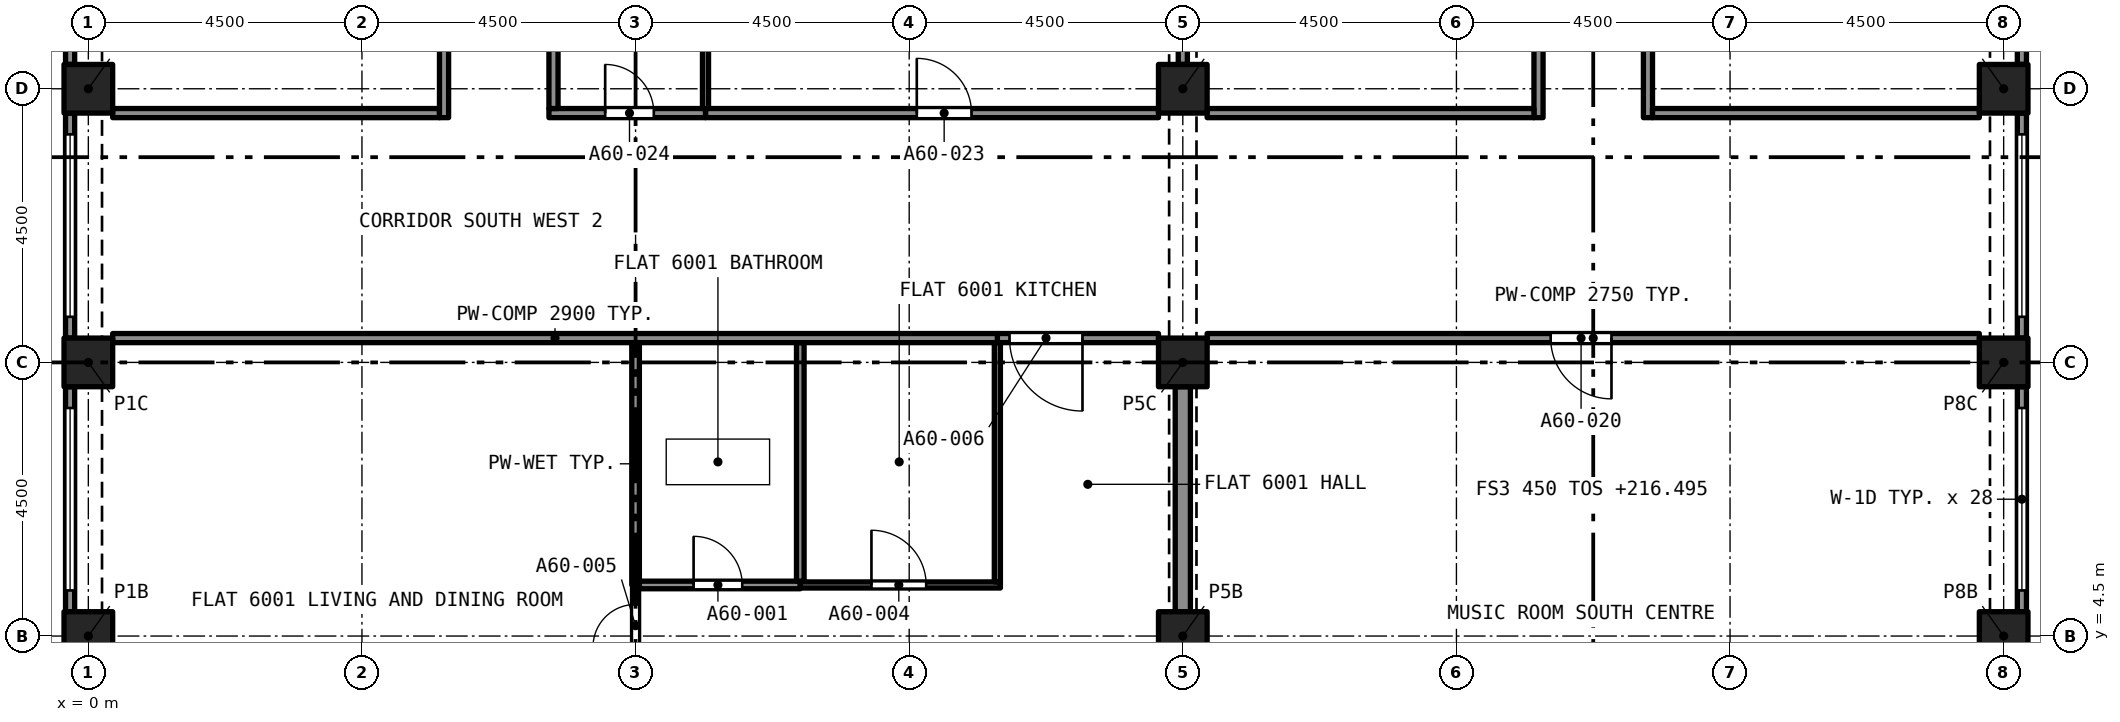
"""IFC4 building model, lengths in metres.
Left out: names, types, materials, properties, quantities, classifications, styles, units other than length and angle.
Written with IfcOpenShell. Run it as: python <this file> out.ifc"""

import sys

from ifc_helpers import new_model, si_unit, direction, frame, frame_2d, origin, origin_2d, place, context, subcontext, project, spatial, rectangle, extrude, element, fill, save


model = new_model("IFC4")
c1 = context("Model", 3, precision=1e-05, world=origin(), true_north=direction((0.0, 1.0)))
c2 = subcontext(c1, "Body", "Model", "MODEL_VIEW")
j1 = project(units=[si_unit("LENGTHUNIT", "METRE"), si_unit("PLANEANGLEUNIT", "RADIAN")], contexts=[c1])
p1 = place(None, origin())
s1 = spatial("IfcSite", under=j1, at=p1, CompositionType="ELEMENT")
p2 = place(p1, origin())
s2 = spatial("IfcBuilding", under=s1, at=p2, CompositionType="ELEMENT")
p3 = place(p2, frame((0.0, 0.0, 216.495)))
s3 = spatial("IfcBuildingStorey", under=s2, at=p3, CompositionType="ELEMENT", Elevation=216.495)
for number, where, z_axis, x_axis in (
    (1, (0.0, 4.5, 0.0), (0.0, 0.0, 1.0), (1.0, 0.0, 0.0)),
    (2, (18.0, 4.5, 0.0), (0.0, 0.0, 1.0), (1.0, 0.0, 0.0)),
    (3, (31.5, 4.5, 0.0), (0.0, 0.0, 1.0), (1.0, 0.0, 0.0)),
    (4, (0.0, 9.0, 0.0), (0.0, 0.0, 1.0), (1.0, 0.0, 0.0)),
    (5, (18.0, 9.0, 0.0), (0.0, 0.0, 1.0), (1.0, 0.0, 0.0)),
    (6, (31.5, 9.0, 0.0), (0.0, 0.0, 1.0), (1.0, 0.0, 0.0)),
    (7, (0.0, 13.5, 0.0), (0.0, 0.0, 1.0), (1.0, 0.0, 0.0)),
    (8, (18.0, 13.5, 0.0), (0.0, 0.0, 1.0), (1.0, 0.0, 0.0)),
    (9, (31.5, 13.5, 0.0), (0.0, 0.0, 1.0), (1.0, 0.0, 0.0)),
):
    element("IfcColumn", number, at=place(p3, frame(where, z_axis=z_axis, x_axis=x_axis)), inside=s3, PredefinedType="COLUMN", context=c2, shape_type="SweptSolid", body=[
        extrude(rectangle(XDim=0.8, YDim=0.8, at=origin_2d()), origin(), (0.0, 0.0, 1.0), 3.2),
    ])
p4 = place(p3, frame((31.8, 8.6, 0.0), z_axis=(0.0, 0.0, 1.0), x_axis=(0.0, -1.0, 0.0)))
e10 = element("IfcWall", 10, at=p4, inside=s3, PredefinedType="SOLIDWALL", context=c2, shape_type="SweptSolid", body=[
    extrude(rectangle(XDim=3.7, YDim=0.15, at=frame_2d((1.85, 0.0))), origin(), (0.0, 0.0, 1.0), 3.2),
])
p5 = place(p4, frame((0.35, 0.0, 0.45)))
e11 = element("IfcOpeningElement", 11, at=p5, cuts=e10, PredefinedType="OPENING", context=c2, shape_type="SweptSolid", body=[
    extrude(rectangle(XDim=3.0, YDim=1.95, at=frame_2d((1.5, 0.975))), frame((0.0, 0.085, 0.0), z_axis=(0.0, -1.0, 0.0), x_axis=(1.0, 0.0, 0.0)), (0.0, 0.0, 1.0), 0.17),
])
p6 = place(p3, frame((31.8, 13.1, 0.0), z_axis=(0.0, 0.0, 1.0), x_axis=(0.0, -1.0, 0.0)))
e12 = element("IfcWall", 12, at=p6, inside=s3, PredefinedType="SOLIDWALL", context=c2, shape_type="SweptSolid", body=[
    extrude(rectangle(XDim=3.7, YDim=0.15, at=frame_2d((1.85, 0.0))), origin(), (0.0, 0.0, 1.0), 3.2),
])
p7 = place(p6, frame((0.35, 0.0, 0.45)))
e13 = element("IfcOpeningElement", 13, at=p7, cuts=e12, PredefinedType="OPENING", context=c2, shape_type="SweptSolid", body=[
    extrude(rectangle(XDim=3.0, YDim=1.95, at=frame_2d((1.5, 0.975))), frame((0.0, 0.085, 0.0), z_axis=(0.0, -1.0, 0.0), x_axis=(1.0, 0.0, 0.0)), (0.0, 0.0, 1.0), 0.17),
])
p8 = place(p3, frame((31.8, 17.6, 0.0), z_axis=(0.0, 0.0, 1.0), x_axis=(0.0, -1.0, 0.0)))
e14 = element("IfcWall", 14, at=p8, inside=s3, PredefinedType="SOLIDWALL", context=c2, shape_type="SweptSolid", body=[
    extrude(rectangle(XDim=3.7, YDim=0.15, at=frame_2d((1.85, 0.0))), origin(), (0.0, 0.0, 1.0), 3.2),
])
p9 = place(p8, frame((0.35, 0.0, 0.45)))
e15 = element("IfcOpeningElement", 15, at=p9, cuts=e14, PredefinedType="OPENING", context=c2, shape_type="SweptSolid", body=[
    extrude(rectangle(XDim=3.0, YDim=1.95, at=frame_2d((1.5, 0.975))), frame((0.0, 0.085, 0.0), z_axis=(0.0, -1.0, 0.0), x_axis=(1.0, 0.0, 0.0)), (0.0, 0.0, 1.0), 0.17),
])
p10 = place(p3, frame((-0.3, 13.9, 0.0), z_axis=(0.0, 0.0, 1.0), x_axis=(0.0, 1.0, 0.0)))
e16 = element("IfcWall", 16, at=p10, inside=s3, PredefinedType="SOLIDWALL", context=c2, shape_type="SweptSolid", body=[
    extrude(rectangle(XDim=3.7, YDim=0.15, at=frame_2d((1.85, 0.0))), origin(), (0.0, 0.0, 1.0), 3.2),
])
p11 = place(p10, frame((0.35, 0.0, 0.45)))
e17 = element("IfcOpeningElement", 17, at=p11, cuts=e16, PredefinedType="OPENING", context=c2, shape_type="SweptSolid", body=[
    extrude(rectangle(XDim=3.0, YDim=1.95, at=frame_2d((1.5, 0.975))), frame((0.0, 0.085, 0.0), z_axis=(0.0, -1.0, 0.0), x_axis=(1.0, 0.0, 0.0)), (0.0, 0.0, 1.0), 0.17),
])
p12 = place(p3, frame((-0.3, 9.4, 0.0), z_axis=(0.0, 0.0, 1.0), x_axis=(0.0, 1.0, 0.0)))
e18 = element("IfcWall", 18, at=p12, inside=s3, PredefinedType="SOLIDWALL", context=c2, shape_type="SweptSolid", body=[
    extrude(rectangle(XDim=3.7, YDim=0.15, at=frame_2d((1.85, 0.0))), origin(), (0.0, 0.0, 1.0), 3.2),
])
p13 = place(p12, frame((0.35, 0.0, 0.45)))
e19 = element("IfcOpeningElement", 19, at=p13, cuts=e18, PredefinedType="OPENING", context=c2, shape_type="SweptSolid", body=[
    extrude(rectangle(XDim=3.0, YDim=1.95, at=frame_2d((1.5, 0.975))), frame((0.0, 0.085, 0.0), z_axis=(0.0, -1.0, 0.0), x_axis=(1.0, 0.0, 0.0)), (0.0, 0.0, 1.0), 0.17),
])
p14 = place(p3, frame((-0.3, 4.9, 0.0), z_axis=(0.0, 0.0, 1.0), x_axis=(0.0, 1.0, 0.0)))
e20 = element("IfcWall", 20, at=p14, inside=s3, PredefinedType="SOLIDWALL", context=c2, shape_type="SweptSolid", body=[
    extrude(rectangle(XDim=3.7, YDim=0.15, at=frame_2d((1.85, 0.0))), origin(), (0.0, 0.0, 1.0), 3.2),
])
p15 = place(p14, frame((0.35, 0.0, 0.45)))
e21 = element("IfcOpeningElement", 21, at=p15, cuts=e20, PredefinedType="OPENING", context=c2, shape_type="SweptSolid", body=[
    extrude(rectangle(XDim=3.0, YDim=1.95, at=frame_2d((1.5, 0.975))), frame((0.0, 0.085, 0.0), z_axis=(0.0, -1.0, 0.0), x_axis=(1.0, 0.0, 0.0)), (0.0, 0.0, 1.0), 0.17),
])
p16 = place(p3, frame((9.062, 5.34, 0.0), z_axis=(0.0, 0.0, 1.0), x_axis=(1.0, 0.0, 0.0)))
e22 = element("IfcWall", 22, at=p16, inside=s3, PredefinedType="PARTITIONING", context=c2, shape_type="SweptSolid", body=[
    extrude(rectangle(XDim=2.646, YDim=0.125, at=frame_2d((1.323, 0.0))), origin(), (0.0, 0.0, 1.0), 2.9),
])
p17 = place(p16, frame((0.892, 0.0, 0.0)))
e23 = element("IfcOpeningElement", 23, at=p17, cuts=e22, PredefinedType="OPENING", context=c2, shape_type="SweptSolid", body=[
    extrude(rectangle(XDim=0.8, YDim=2.1, at=frame_2d((0.4, 1.05))), frame((0.0, 0.073, 0.0), z_axis=(0.0, -1.0, 0.0), x_axis=(1.0, 0.0, 0.0)), (0.0, 0.0, 1.0), 0.145),
])
p18 = place(p3, frame((11.709, 5.403, 0.0), z_axis=(0.0, 0.0, 1.0), x_axis=(0.0, 1.0, 0.0)))
e24 = element("IfcWall", 24, at=p18, inside=s3, PredefinedType="PARTITIONING", context=c2, shape_type="SweptSolid", body=[
    extrude(rectangle(XDim=3.922, YDim=0.125, at=frame_2d((1.961, 0.0))), origin(), (0.0, 0.0, 1.0), 2.9),
])
p19 = place(p3, frame((9.0, 5.34, 0.0), z_axis=(0.0, 0.0, 1.0), x_axis=(0.0, 1.0, 0.0)))
e25 = element("IfcWall", 25, at=p19, inside=s3, PredefinedType="PARTITIONING", context=c2, shape_type="SweptSolid", body=[
    extrude(rectangle(XDim=3.985, YDim=0.125, at=frame_2d((1.992, 0.0))), origin(), (0.0, 0.0, 1.0), 2.9),
])
p20 = place(p3, frame((11.708, 5.34, 0.0), z_axis=(0.0, 0.0, 1.0), x_axis=(1.0, 0.0, 0.0)))
e26 = element("IfcWall", 26, at=p20, inside=s3, PredefinedType="PARTITIONING", context=c2, shape_type="SweptSolid", body=[
    extrude(rectangle(XDim=3.292, YDim=0.1, at=frame_2d((1.646, 0.0))), origin(), (0.0, 0.0, 1.0), 2.9),
])
p21 = place(p20, frame((1.171, 0.0, 0.0)))
e27 = element("IfcOpeningElement", 27, at=p21, cuts=e26, PredefinedType="OPENING", context=c2, shape_type="SweptSolid", body=[
    extrude(rectangle(XDim=0.9, YDim=2.1, at=frame_2d((0.45, 1.05))), frame((0.0, 0.06, 0.0), z_axis=(0.0, -1.0, 0.0), x_axis=(1.0, 0.0, 0.0)), (0.0, 0.0, 1.0), 0.12),
])
p22 = place(p3, frame((14.95, 5.39, 0.0), z_axis=(0.0, 0.0, 1.0), x_axis=(0.0, 1.0, 0.0)))
e28 = element("IfcWall", 28, at=p22, inside=s3, PredefinedType="PARTITIONING", context=c2, shape_type="SweptSolid", body=[
    extrude(rectangle(XDim=3.935, YDim=0.1, at=frame_2d((1.968, 0.0))), origin(), (0.0, 0.0, 1.0), 2.9),
])
p23 = place(p3, frame((9.0, 4.0, 0.0), z_axis=(0.0, 0.0, 1.0), x_axis=(0.0, 1.0, 0.0)))
e29 = element("IfcWall", 29, at=p23, inside=s3, PredefinedType="PARTITIONING", context=c2, shape_type="SweptSolid", body=[
    extrude(rectangle(XDim=1.34, YDim=0.1, at=frame_2d((0.67, 0.0))), origin(), (0.0, 0.0, 1.0), 2.9),
])
p24 = place(p23, frame((0.32, 0.0, 0.0)))
e30 = element("IfcOpeningElement", 30, at=p24, cuts=e29, PredefinedType="OPENING", context=c2, shape_type="SweptSolid", body=[
    extrude(rectangle(XDim=0.7, YDim=2.1, at=frame_2d((0.35, 1.05))), frame((0.0, 0.06, 0.0), z_axis=(0.0, -1.0, 0.0), x_axis=(1.0, 0.0, 0.0)), (0.0, 0.0, 1.0), 0.12),
])
p25 = place(p3, frame((18.0, 4.9, 0.0), z_axis=(0.0, 0.0, 1.0), x_axis=(0.0, 1.0, 0.0)))
e31 = element("IfcWall", 31, at=p25, inside=s3, PredefinedType="PARTITIONING", context=c2, shape_type="SweptSolid", body=[
    extrude(rectangle(XDim=3.7, YDim=0.25, at=frame_2d((1.85, 0.0))), origin(), (0.0, 0.0, 1.0), 2.38),
])
p26 = place(p3, frame((17.6, 9.4, 0.0), z_axis=(0.0, 0.0, 1.0), x_axis=(-1.0, 0.0, 0.0)))
e32 = element("IfcWall", 32, at=p26, inside=s3, PredefinedType="PARTITIONING", context=c2, shape_type="SweptSolid", body=[
    extrude(rectangle(XDim=2.65, YDim=0.15, at=frame_2d((1.325, 0.0))), origin(), (0.0, 0.0, 1.0), 2.9),
])
p27 = place(p26, frame((1.25, 0.0, 0.0)))
e33 = element("IfcOpeningElement", 33, at=p27, cuts=e32, PredefinedType="OPENING", context=c2, shape_type="SweptSolid", body=[
    extrude(rectangle(XDim=1.2, YDim=2.4, at=frame_2d((0.6, 1.2))), frame((0.0, 0.085, 0.0), z_axis=(0.0, -1.0, 0.0), x_axis=(1.0, 0.0, 0.0)), (0.0, 0.0, 1.0), 0.17),
])
p28 = place(p3, frame((0.4, 9.4, 0.0), z_axis=(0.0, 0.0, 1.0), x_axis=(1.0, 0.0, 0.0)))
e34 = element("IfcWall", 34, at=p28, inside=s3, PredefinedType="PARTITIONING", context=c2, shape_type="SweptSolid", body=[
    extrude(rectangle(XDim=14.55, YDim=0.15, at=frame_2d((7.275, 0.0))), origin(), (0.0, 0.0, 1.0), 2.9),
])
p29 = place(p3, frame((31.1, 9.4, 0.0), z_axis=(0.0, 0.0, 1.0), x_axis=(-1.0, 0.0, 0.0)))
e35 = element("IfcWall", 35, at=p29, inside=s3, PredefinedType="PARTITIONING", context=c2, shape_type="SweptSolid", body=[
    extrude(rectangle(XDim=12.7, YDim=0.15, at=frame_2d((6.35, 0.0))), origin(), (0.0, 0.0, 1.0), 2.75),
])
p30 = place(p29, frame((6.05, 0.0, 0.0)))
e36 = element("IfcOpeningElement", 36, at=p30, cuts=e35, PredefinedType="OPENING", context=c2, shape_type="SweptSolid", body=[
    extrude(rectangle(XDim=1.0, YDim=2.1, at=frame_2d((0.5, 1.05))), frame((0.0, 0.085, 0.0), z_axis=(0.0, -1.0, 0.0), x_axis=(1.0, 0.0, 0.0)), (0.0, 0.0, 1.0), 0.17),
])
p31 = place(p3, frame((23.85, 13.025, 0.0), z_axis=(0.0, 0.0, 1.0), x_axis=(0.0, 1.0, 0.0)))
e37 = element("IfcWall", 37, at=p31, inside=s3, PredefinedType="PARTITIONING", context=c2, shape_type="SweptSolid", body=[
    extrude(rectangle(XDim=9.55, YDim=0.15, at=frame_2d((4.775, 0.0))), origin(), (0.0, 0.0, 1.0), 2.75),
])
p32 = place(p31, frame((4.275, 0.0, 0.0)))
e38 = element("IfcOpeningElement", 38, at=p32, cuts=e37, PredefinedType="OPENING", context=c2, shape_type="SweptSolid", body=[
    extrude(rectangle(XDim=1.0, YDim=2.1, at=frame_2d((0.5, 1.05))), frame((0.0, 0.085, 0.0), z_axis=(0.0, -1.0, 0.0), x_axis=(1.0, 0.0, 0.0)), (0.0, 0.0, 1.0), 0.17),
])
p33 = place(p3, frame((25.65, 22.575, 0.0), z_axis=(0.0, 0.0, 1.0), x_axis=(0.0, -1.0, 0.0)))
e39 = element("IfcWall", 39, at=p33, inside=s3, PredefinedType="PARTITIONING", context=c2, shape_type="SweptSolid", body=[
    extrude(rectangle(XDim=9.55, YDim=0.15, at=frame_2d((4.775, 0.0))), origin(), (0.0, 0.0, 1.0), 2.75),
])
p34 = place(p33, frame((4.275, 0.0, 0.0)))
e40 = element("IfcOpeningElement", 40, at=p34, cuts=e39, PredefinedType="OPENING", context=c2, shape_type="SweptSolid", body=[
    extrude(rectangle(XDim=1.0, YDim=2.1, at=frame_2d((0.5, 1.05))), frame((0.0, 0.085, 0.0), z_axis=(0.0, -1.0, 0.0), x_axis=(1.0, 0.0, 0.0)), (0.0, 0.0, 1.0), 0.17),
])
for number, where, z_axis, x_axis in (
    (41, (18.4, 13.1, 0.0), (0.0, 0.0, 1.0), (1.0, 0.0, 0.0)),
    (42, (25.725, 13.1, 0.0), (0.0, 0.0, 1.0), (1.0, 0.0, 0.0)),
):
    element("IfcWall", number, at=place(p3, frame(where, z_axis=z_axis, x_axis=x_axis)), inside=s3, PredefinedType="PARTITIONING", context=c2, shape_type="SweptSolid", body=[
        extrude(rectangle(XDim=5.375, YDim=0.15, at=frame_2d((2.688, 0.0))), origin(), (0.0, 0.0, 1.0), 2.75),
    ])
p35 = place(p3, frame((10.15, 13.1, 0.0), z_axis=(0.0, 0.0, 1.0), x_axis=(1.0, 0.0, 0.0)))
e43 = element("IfcWall", 43, at=p35, inside=s3, PredefinedType="PARTITIONING", context=c2, shape_type="SweptSolid", body=[
    extrude(rectangle(XDim=7.45, YDim=0.15, at=frame_2d((3.725, 0.0))), origin(), (0.0, 0.0, 1.0), 2.9),
])
p36 = place(p35, frame((3.475, 0.0, 0.0)))
e44 = element("IfcOpeningElement", 44, at=p36, cuts=e43, PredefinedType="OPENING", context=c2, shape_type="SweptSolid", body=[
    extrude(rectangle(XDim=0.9, YDim=2.1, at=frame_2d((0.45, 1.05))), frame((0.0, 0.085, 0.0), z_axis=(0.0, -1.0, 0.0), x_axis=(1.0, 0.0, 0.0)), (0.0, 0.0, 1.0), 0.17),
])
p37 = place(p3, frame((7.575, 13.1, 0.0), z_axis=(0.0, 0.0, 1.0), x_axis=(1.0, 0.0, 0.0)))
e45 = element("IfcWall", 45, at=p37, inside=s3, PredefinedType="PARTITIONING", context=c2, shape_type="SweptSolid", body=[
    extrude(rectangle(XDim=2.575, YDim=0.15, at=frame_2d((1.288, 0.0))), origin(), (0.0, 0.0, 1.0), 2.9),
])
p38 = place(p37, frame((0.925, 0.0, 0.0)))
e46 = element("IfcOpeningElement", 46, at=p38, cuts=e45, PredefinedType="OPENING", context=c2, shape_type="SweptSolid", body=[
    extrude(rectangle(XDim=0.8, YDim=2.1, at=frame_2d((0.4, 1.05))), frame((0.0, 0.085, 0.0), z_axis=(0.0, -1.0, 0.0), x_axis=(1.0, 0.0, 0.0)), (0.0, 0.0, 1.0), 0.17),
])
p39 = place(p3, frame((0.4, 13.1, 0.0), z_axis=(0.0, 0.0, 1.0), x_axis=(1.0, 0.0, 0.0)))
e47 = element("IfcWall", 47, at=p39, inside=s3, PredefinedType="PARTITIONING", context=c2, shape_type="SweptSolid", body=[
    extrude(rectangle(XDim=5.375, YDim=0.15, at=frame_2d((2.688, 0.0))), origin(), (0.0, 0.0, 1.0), 2.9),
])
p40 = place(p3, frame((18.0, 13.9, 0.0), z_axis=(0.0, 0.0, 1.0), x_axis=(0.0, 1.0, 0.0)))
e48 = element("IfcWall", 48, at=p40, inside=s3, PredefinedType="PARTITIONING", context=c2, shape_type="SweptSolid", body=[
    extrude(rectangle(XDim=1.8, YDim=0.15, at=frame_2d((0.9, 0.0))), origin(), (0.0, 0.0, 1.0), 2.38),
])
p41 = place(p3, frame((7.65, 13.175, 0.0), z_axis=(0.0, 0.0, 1.0), x_axis=(0.0, 1.0, 0.0)))
e49 = element("IfcWall", 49, at=p41, inside=s3, PredefinedType="PARTITIONING", context=c2, shape_type="SweptSolid", body=[
    extrude(rectangle(XDim=2.525, YDim=0.15, at=frame_2d((1.262, 0.0))), origin(), (0.0, 0.0, 1.0), 2.9),
])
p42 = place(p3, frame((5.85, 13.025, 0.0), z_axis=(0.0, 0.0, 1.0), x_axis=(0.0, 1.0, 0.0)))
e50 = element("IfcWall", 50, at=p42, inside=s3, PredefinedType="PARTITIONING", context=c2, shape_type="SweptSolid", body=[
    extrude(rectangle(XDim=9.475, YDim=0.15, at=frame_2d((4.738, 0.0))), origin(), (0.0, 0.0, 1.0), 2.9),
])
p43 = place(p42, frame((4.275, 0.0, 0.0)))
e51 = element("IfcOpeningElement", 51, at=p43, cuts=e50, PredefinedType="OPENING", context=c2, shape_type="SweptSolid", body=[
    extrude(rectangle(XDim=1.0, YDim=2.1, at=frame_2d((0.5, 1.05))), frame((0.0, 0.085, 0.0), z_axis=(0.0, -1.0, 0.0), x_axis=(1.0, 0.0, 0.0)), (0.0, 0.0, 1.0), 0.17),
])
p44 = place(p3, frame((10.15, 13.175, 0.0), z_axis=(0.0, 0.0, 1.0), x_axis=(0.0, 1.0, 0.0)))
e52 = element("IfcWall", 52, at=p44, inside=s3, PredefinedType="PARTITIONING", context=c2, shape_type="SweptSolid", body=[
    extrude(rectangle(XDim=2.45, YDim=0.1, at=frame_2d((1.225, 0.0))), origin(), (0.0, 0.0, 1.0), 2.9),
])
p45 = place(p5, origin())
e53 = element("IfcWindow", 53, at=p45, inside=s3, PartitioningType="SINGLE_PANEL", PredefinedType="WINDOW", context=c2, shape_type="SweptSolid", body=[
    extrude(rectangle(XDim=3.0, YDim=1.95, at=frame_2d((1.5, 0.975))), frame((0.0, 0.03, 0.0), z_axis=(0.0, -1.0, 0.0), x_axis=(1.0, 0.0, 0.0)), (0.0, 0.0, 1.0), 0.06),
])
fill(e11, e53)
p46 = place(p7, origin())
e54 = element("IfcWindow", 54, at=p46, inside=s3, PartitioningType="SINGLE_PANEL", PredefinedType="WINDOW", context=c2, shape_type="SweptSolid", body=[
    extrude(rectangle(XDim=3.0, YDim=1.95, at=frame_2d((1.5, 0.975))), frame((0.0, 0.03, 0.0), z_axis=(0.0, -1.0, 0.0), x_axis=(1.0, 0.0, 0.0)), (0.0, 0.0, 1.0), 0.06),
])
fill(e13, e54)
p47 = place(p13, origin())
e55 = element("IfcWindow", 55, at=p47, inside=s3, PartitioningType="SINGLE_PANEL", PredefinedType="WINDOW", context=c2, shape_type="SweptSolid", body=[
    extrude(rectangle(XDim=3.0, YDim=1.95, at=frame_2d((1.5, 0.975))), frame((0.0, 0.03, 0.0), z_axis=(0.0, -1.0, 0.0), x_axis=(1.0, 0.0, 0.0)), (0.0, 0.0, 1.0), 0.06),
])
fill(e19, e55)
p48 = place(p15, origin())
e56 = element("IfcWindow", 56, at=p48, inside=s3, PartitioningType="SINGLE_PANEL", PredefinedType="WINDOW", context=c2, shape_type="SweptSolid", body=[
    extrude(rectangle(XDim=3.0, YDim=1.95, at=frame_2d((1.5, 0.975))), frame((0.0, 0.03, 0.0), z_axis=(0.0, -1.0, 0.0), x_axis=(1.0, 0.0, 0.0)), (0.0, 0.0, 1.0), 0.06),
])
fill(e21, e56)
p49 = place(p17, origin())
e57 = element("IfcDoor", 57, at=p49, inside=s3, OperationType="SINGLE_SWING_LEFT", PredefinedType="DOOR", context=c2, shape_type="SweptSolid", body=[
    extrude(rectangle(XDim=0.8, YDim=2.1, at=frame_2d((0.4, 1.05))), frame((0.0, 0.025, 0.0), z_axis=(0.0, -1.0, 0.0), x_axis=(1.0, 0.0, 0.0)), (0.0, 0.0, 1.0), 0.05),
])
fill(e23, e57)
p50 = place(p21, origin())
e58 = element("IfcDoor", 58, at=p50, inside=s3, OperationType="SINGLE_SWING_LEFT", PredefinedType="DOOR", context=c2, shape_type="SweptSolid", body=[
    extrude(rectangle(XDim=0.9, YDim=2.1, at=frame_2d((0.45, 1.05))), frame((0.0, 0.025, 0.0), z_axis=(0.0, -1.0, 0.0), x_axis=(1.0, 0.0, 0.0)), (0.0, 0.0, 1.0), 0.05),
])
fill(e27, e58)
p51 = place(p24, origin())
e59 = element("IfcDoor", 59, at=p51, inside=s3, OperationType="SINGLE_SWING_RIGHT", PredefinedType="DOOR", context=c2, shape_type="SweptSolid", body=[
    extrude(rectangle(XDim=0.7, YDim=2.1, at=frame_2d((0.35, 1.05))), frame((0.0, 0.025, 0.0), z_axis=(0.0, -1.0, 0.0), x_axis=(1.0, 0.0, 0.0)), (0.0, 0.0, 1.0), 0.05),
])
fill(e30, e59)
p52 = place(p27, origin())
e60 = element("IfcDoor", 60, at=p52, inside=s3, OperationType="SINGLE_SWING_RIGHT", PredefinedType="DOOR", context=c2, shape_type="SweptSolid", body=[
    extrude(rectangle(XDim=1.2, YDim=2.4, at=frame_2d((0.6, 1.2))), frame((0.0, 0.025, 0.0), z_axis=(0.0, -1.0, 0.0), x_axis=(1.0, 0.0, 0.0)), (0.0, 0.0, 1.0), 0.05),
])
fill(e33, e60)
p53 = place(p30, origin())
e61 = element("IfcDoor", 61, at=p53, inside=s3, OperationType="SINGLE_SWING_RIGHT", PredefinedType="DOOR", context=c2, shape_type="SweptSolid", body=[
    extrude(rectangle(XDim=1.0, YDim=2.1, at=frame_2d((0.5, 1.05))), frame((0.0, 0.025, 0.0), z_axis=(0.0, -1.0, 0.0), x_axis=(1.0, 0.0, 0.0)), (0.0, 0.0, 1.0), 0.05),
])
fill(e36, e61)
p54 = place(p36, origin())
e62 = element("IfcDoor", 62, at=p54, inside=s3, OperationType="SINGLE_SWING_RIGHT", PredefinedType="DOOR", context=c2, shape_type="SweptSolid", body=[
    extrude(rectangle(XDim=0.9, YDim=2.1, at=frame_2d((0.45, 1.05))), frame((0.0, 0.025, 0.0), z_axis=(0.0, -1.0, 0.0), x_axis=(1.0, 0.0, 0.0)), (0.0, 0.0, 1.0), 0.05),
])
fill(e44, e62)
p55 = place(p38, origin())
e63 = element("IfcDoor", 63, at=p55, inside=s3, OperationType="SINGLE_SWING_RIGHT", PredefinedType="DOOR", context=c2, shape_type="SweptSolid", body=[
    extrude(rectangle(XDim=0.8, YDim=2.1, at=frame_2d((0.4, 1.05))), frame((0.0, 0.025, 0.0), z_axis=(0.0, -1.0, 0.0), x_axis=(1.0, 0.0, 0.0)), (0.0, 0.0, 1.0), 0.05),
])
fill(e46, e63)
save(model, sys.argv[1])
